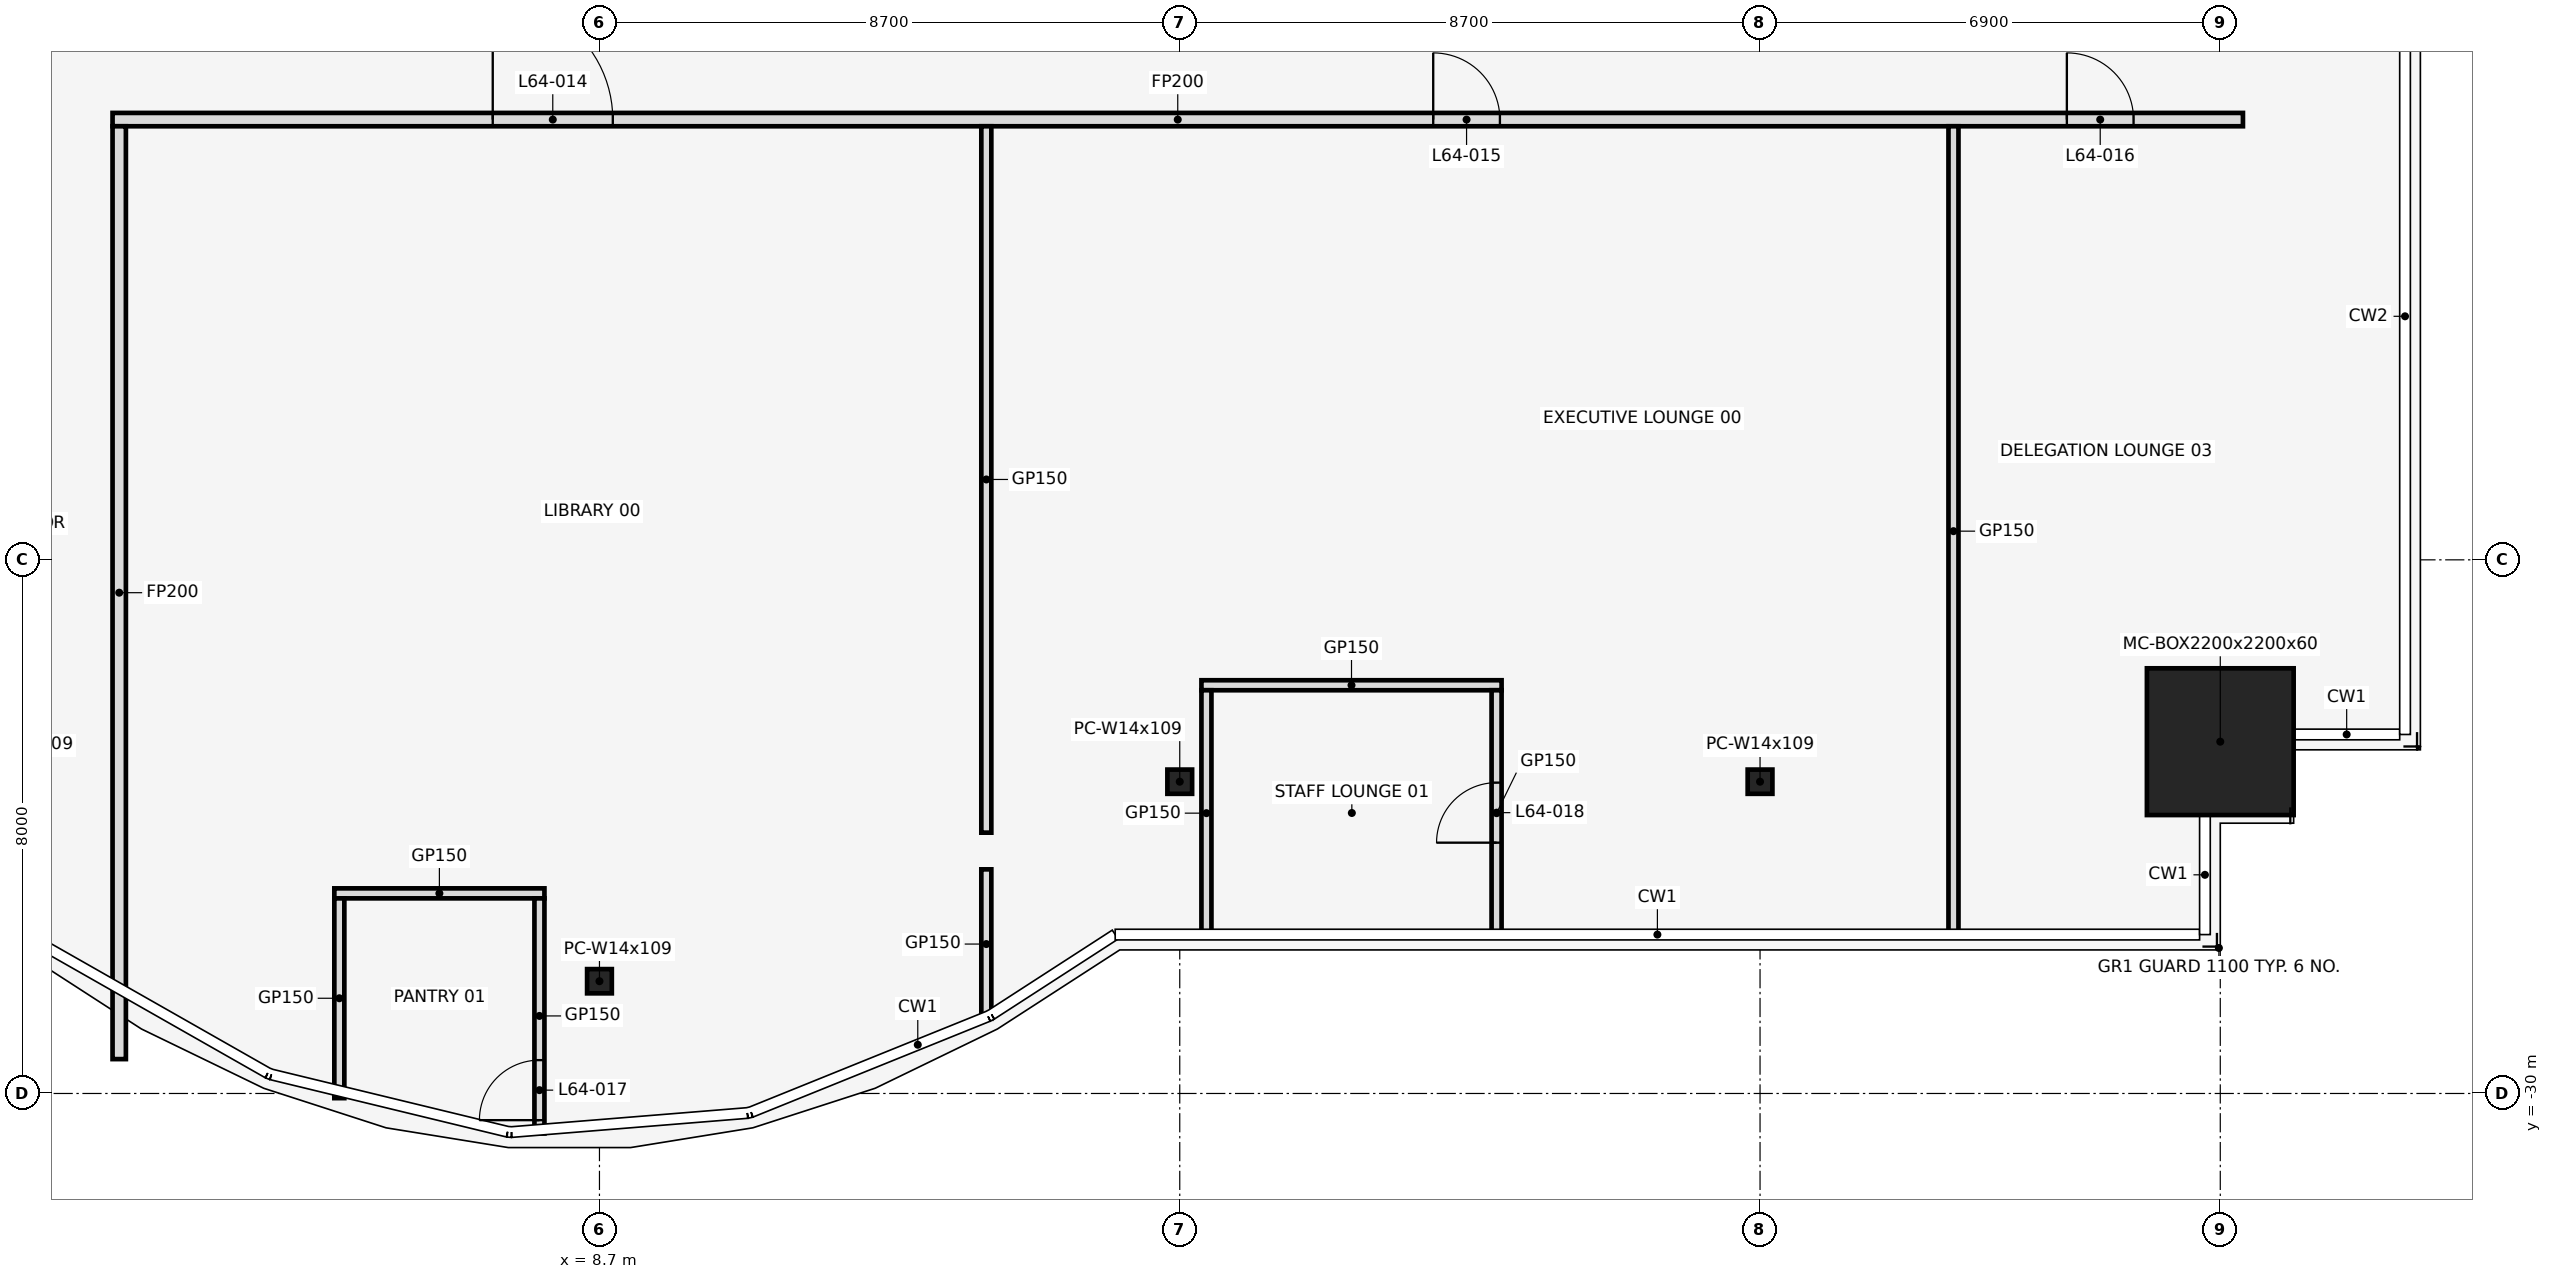
"""IFC4 building model, lengths in metres.
Left out: names, types, materials, properties, quantities, classifications, styles, units other than length and angle.
Written with IfcOpenShell. Run it as: python <this file> out.ifc"""

import sys

from ifc_helpers import new_model, si_unit, direction, frame, frame_2d, origin, origin_2d, place, context, subcontext, project, spatial, rectangle, hollow_rectangle, i_section, extrude, element, fill, save


model = new_model("IFC4")
c1 = context("Model", 3, precision=1e-05, world=origin(), true_north=direction((0.0, 1.0)))
c2 = subcontext(c1, "Body", "Model", "MODEL_VIEW")
j1 = project(units=[si_unit("LENGTHUNIT", "METRE"), si_unit("PLANEANGLEUNIT", "RADIAN")], contexts=[c1])
p1 = place(None, origin())
s1 = spatial("IfcSite", under=j1, at=p1, CompositionType="ELEMENT")
p2 = place(p1, origin())
s2 = spatial("IfcBuilding", under=s1, at=p2, CompositionType="ELEMENT")
p3 = place(p2, frame((0.0, 0.0, 283.4)))
s3 = spatial("IfcBuildingStorey", under=s2, at=p3, CompositionType="ELEMENT", Elevation=283.4)
for number, where, z_axis, x_axis in (
    (1, (8.7, -28.317, 0.0), (0.0, 0.0, 1.0), (1.0, 0.0, 0.0)),
    (2, (17.4, -25.326, 0.0), (0.0, 0.0, 1.0), (1.0, 0.0, 0.0)),
    (3, (26.1, -25.326, 0.0), (0.0, 0.0, 1.0), (1.0, 0.0, 0.0)),
):
    element("IfcColumn", number, at=place(p3, frame(where, z_axis=z_axis, x_axis=x_axis)), inside=s3, PredefinedType="COLUMN", context=c2, shape_type="SweptSolid", body=[
        extrude(i_section(OverallWidth=0.371, OverallDepth=0.363, WebThickness=0.013, FlangeThickness=0.022, at=origin_2d()), origin(), (0.0, 0.0, 1.0), 4.2),
    ])
p4 = place(p3, frame((33.0, -24.726, 0.0), z_axis=(0.0, 0.0, 1.0), x_axis=(1.0, 0.0, 0.0)))
e4 = element("IfcColumn", 4, at=p4, inside=s3, PredefinedType="COLUMN", context=c2, shape_type="SweptSolid", body=[
    extrude(hollow_rectangle(XDim=2.2, YDim=2.2, WallThickness=0.06, at=origin_2d()), origin(), (0.0, 0.0, 1.0), 4.2),
])
p5 = place(p3, frame((4.725, -27.0, 0.0), z_axis=(0.0, 0.0, 1.0), x_axis=(1.0, 0.0, 0.0)))
e5 = element("IfcWall", 5, at=p5, inside=s3, PredefinedType="PARTITIONING", context=c2, shape_type="SweptSolid", body=[
    extrude(rectangle(XDim=3.15, YDim=0.15, at=frame_2d((1.575, 0.0))), origin(), (0.0, 0.0, 1.0), 3.068),
])
p6 = place(p3, frame((17.725, -23.88, 0.0), z_axis=(0.0, 0.0, 1.0), x_axis=(1.0, 0.0, 0.0)))
e6 = element("IfcWall", 6, at=p6, inside=s3, PredefinedType="PARTITIONING", context=c2, shape_type="SweptSolid", body=[
    extrude(rectangle(XDim=4.5, YDim=0.15, at=frame_2d((2.25, 0.0))), origin(), (0.0, 0.0, 1.0), 3.068),
])
p7 = place(p3, frame((1.4, -15.4, 0.0), z_axis=(0.0, 0.0, 1.0), x_axis=(1.0, 0.0, 0.0)))
e7 = element("IfcWall", 7, at=p7, inside=s3, PredefinedType="PARTITIONING", context=c2, shape_type="SweptSolid", body=[
    extrude(rectangle(XDim=31.94, YDim=0.2, at=frame_2d((15.97, 0.0))), origin(), (0.0, 0.0, 1.0), 3.068),
])
p8 = place(p7, frame((5.7, 0.0, 0.0)))
e8 = element("IfcOpeningElement", 8, at=p8, cuts=e7, PredefinedType="OPENING", context=c2, shape_type="SweptSolid", body=[
    extrude(rectangle(XDim=1.8, YDim=2.1, at=frame_2d((0.9, 1.05))), frame((0.0, 0.112, 0.0), z_axis=(0.0, -1.0, 0.0), x_axis=(1.0, 0.0, 0.0)), (0.0, 0.0, 1.0), 0.224),
])
p9 = place(p7, frame((19.8, 0.0, 0.0)))
e9 = element("IfcOpeningElement", 9, at=p9, cuts=e7, PredefinedType="OPENING", context=c2, shape_type="SweptSolid", body=[
    extrude(rectangle(XDim=1.0, YDim=2.1, at=frame_2d((0.5, 1.05))), frame((0.0, 0.112, 0.0), z_axis=(0.0, -1.0, 0.0), x_axis=(1.0, 0.0, 0.0)), (0.0, 0.0, 1.0), 0.224),
])
p10 = place(p7, frame((29.3, 0.0, 0.0)))
e10 = element("IfcOpeningElement", 10, at=p10, cuts=e7, PredefinedType="OPENING", context=c2, shape_type="SweptSolid", body=[
    extrude(rectangle(XDim=1.0, YDim=2.1, at=frame_2d((0.5, 1.05))), frame((0.0, 0.112, 0.0), z_axis=(0.0, -1.0, 0.0), x_axis=(1.0, 0.0, 0.0)), (0.0, 0.0, 1.0), 0.224),
])
p11 = place(p3, frame((1.5, -29.485, 0.0), z_axis=(0.0, 0.0, 1.0), x_axis=(0.0, 1.0, 0.0)))
e11 = element("IfcWall", 11, at=p11, inside=s3, PredefinedType="PARTITIONING", context=c2, shape_type="SweptSolid", body=[
    extrude(rectangle(XDim=13.985, YDim=0.2, at=frame_2d((6.992, 0.0))), origin(), (0.0, 0.0, 1.0), 3.068),
])
p12 = place(p3, frame((4.8, -30.07, 0.0), z_axis=(0.0, 0.0, 1.0), x_axis=(0.0, 1.0, 0.0)))
e12 = element("IfcWall", 12, at=p12, inside=s3, PredefinedType="PARTITIONING", context=c2, shape_type="SweptSolid", body=[
    extrude(rectangle(XDim=2.995, YDim=0.15, at=frame_2d((1.498, 0.0))), origin(), (0.0, 0.0, 1.0), 3.068),
])
p13 = place(p3, frame((7.8, -30.6, 0.0), z_axis=(0.0, 0.0, 1.0), x_axis=(0.0, 1.0, 0.0)))
e13 = element("IfcWall", 13, at=p13, inside=s3, PredefinedType="PARTITIONING", context=c2, shape_type="SweptSolid", body=[
    extrude(rectangle(XDim=3.525, YDim=0.15, at=frame_2d((1.763, 0.0))), origin(), (0.0, 0.0, 1.0), 3.068),
])
p14 = place(p13, frame((0.2, 0.0, 0.0)))
e14 = element("IfcOpeningElement", 14, at=p14, cuts=e13, PredefinedType="OPENING", context=c2, shape_type="SweptSolid", body=[
    extrude(rectangle(XDim=0.9, YDim=2.1, at=frame_2d((0.45, 1.05))), frame((0.0, 0.087, 0.0), z_axis=(0.0, -1.0, 0.0), x_axis=(1.0, 0.0, 0.0)), (0.0, 0.0, 1.0), 0.174),
])
p15 = place(p3, frame((14.5, -28.88, 0.0), z_axis=(0.0, 0.0, 1.0), x_axis=(0.0, 1.0, 0.0)))
e15 = element("IfcWall", 15, at=p15, inside=s3, PredefinedType="PARTITIONING", context=c2, shape_type="SweptSolid", body=[
    extrude(rectangle(XDim=2.24, YDim=0.15, at=frame_2d((1.12, 0.0))), origin(), (0.0, 0.0, 1.0), 3.068),
])
p16 = place(p3, frame((14.5, -26.09, 0.0), z_axis=(0.0, 0.0, 1.0), x_axis=(0.0, 1.0, 0.0)))
e16 = element("IfcWall", 16, at=p16, inside=s3, PredefinedType="PARTITIONING", context=c2, shape_type="SweptSolid", body=[
    extrude(rectangle(XDim=10.59, YDim=0.15, at=frame_2d((5.295, 0.0))), origin(), (0.0, 0.0, 1.0), 3.068),
])
p17 = place(p3, frame((17.8, -27.64, 0.0), z_axis=(0.0, 0.0, 1.0), x_axis=(0.0, 1.0, 0.0)))
e17 = element("IfcWall", 17, at=p17, inside=s3, PredefinedType="PARTITIONING", context=c2, shape_type="SweptSolid", body=[
    extrude(rectangle(XDim=3.685, YDim=0.15, at=frame_2d((1.842, 0.0))), origin(), (0.0, 0.0, 1.0), 3.068),
])
p18 = place(p3, frame((22.15, -27.64, 0.0), z_axis=(0.0, 0.0, 1.0), x_axis=(0.0, 1.0, 0.0)))
e18 = element("IfcWall", 18, at=p18, inside=s3, PredefinedType="PARTITIONING", context=c2, shape_type="SweptSolid", body=[
    extrude(rectangle(XDim=3.685, YDim=0.15, at=frame_2d((1.842, 0.0))), origin(), (0.0, 0.0, 1.0), 3.068),
])
p19 = place(p18, frame((1.4, 0.0, 0.0)))
e19 = element("IfcOpeningElement", 19, at=p19, cuts=e18, PredefinedType="OPENING", context=c2, shape_type="SweptSolid", body=[
    extrude(rectangle(XDim=0.9, YDim=2.1, at=frame_2d((0.45, 1.05))), frame((0.0, 0.087, 0.0), z_axis=(0.0, -1.0, 0.0), x_axis=(1.0, 0.0, 0.0)), (0.0, 0.0, 1.0), 0.174),
])
p20 = place(p3, frame((29.0, -27.64, 0.0), z_axis=(0.0, 0.0, 1.0), x_axis=(0.0, 1.0, 0.0)))
e20 = element("IfcWall", 20, at=p20, inside=s3, PredefinedType="PARTITIONING", context=c2, shape_type="SweptSolid", body=[
    extrude(rectangle(XDim=12.14, YDim=0.15, at=frame_2d((6.07, 0.0))), origin(), (0.0, 0.0, 1.0), 3.068),
])
p21 = place(p8, origin())
e21 = element("IfcDoor", 21, at=p21, inside=s3, OperationType="SINGLE_SWING_LEFT", PredefinedType="DOOR", context=c2, shape_type="SweptSolid", body=[
    extrude(rectangle(XDim=1.8, YDim=2.1, at=frame_2d((0.9, 1.05))), frame((0.0, 0.025, 0.0), z_axis=(0.0, -1.0, 0.0), x_axis=(1.0, 0.0, 0.0)), (0.0, 0.0, 1.0), 0.05),
])
fill(e8, e21)
p22 = place(p9, frame((1.0, 0.0, 0.0), z_axis=(0.0, 0.0, 1.0), x_axis=(-1.0, 0.0, 0.0)))
e22 = element("IfcDoor", 22, at=p22, inside=s3, OperationType="SINGLE_SWING_RIGHT", PredefinedType="DOOR", context=c2, shape_type="SweptSolid", body=[
    extrude(rectangle(XDim=1.0, YDim=2.1, at=frame_2d((0.5, 1.05))), frame((0.0, 0.025, 0.0), z_axis=(0.0, -1.0, 0.0), x_axis=(1.0, 0.0, 0.0)), (0.0, 0.0, 1.0), 0.05),
])
fill(e9, e22)
p23 = place(p10, frame((1.0, 0.0, 0.0), z_axis=(0.0, 0.0, 1.0), x_axis=(-1.0, 0.0, 0.0)))
e23 = element("IfcDoor", 23, at=p23, inside=s3, OperationType="SINGLE_SWING_LEFT", PredefinedType="DOOR", context=c2, shape_type="SweptSolid", body=[
    extrude(rectangle(XDim=1.0, YDim=2.1, at=frame_2d((0.5, 1.05))), frame((0.0, 0.025, 0.0), z_axis=(0.0, -1.0, 0.0), x_axis=(1.0, 0.0, 0.0)), (0.0, 0.0, 1.0), 0.05),
])
fill(e10, e23)
p24 = place(p14, origin())
e24 = element("IfcDoor", 24, at=p24, inside=s3, OperationType="SINGLE_SWING_LEFT", PredefinedType="DOOR", context=c2, shape_type="SweptSolid", body=[
    extrude(rectangle(XDim=0.9, YDim=2.1, at=frame_2d((0.45, 1.05))), frame((0.0, 0.025, 0.0), z_axis=(0.0, -1.0, 0.0), x_axis=(1.0, 0.0, 0.0)), (0.0, 0.0, 1.0), 0.05),
])
fill(e14, e24)
p25 = place(p19, origin())
e25 = element("IfcDoor", 25, at=p25, inside=s3, OperationType="SINGLE_SWING_RIGHT", PredefinedType="DOOR", context=c2, shape_type="SweptSolid", body=[
    extrude(rectangle(XDim=0.9, YDim=2.1, at=frame_2d((0.45, 1.05))), frame((0.0, 0.025, 0.0), z_axis=(0.0, -1.0, 0.0), x_axis=(1.0, 0.0, 0.0)), (0.0, 0.0, 1.0), 0.05),
])
fill(e19, e25)
save(model, sys.argv[1])
